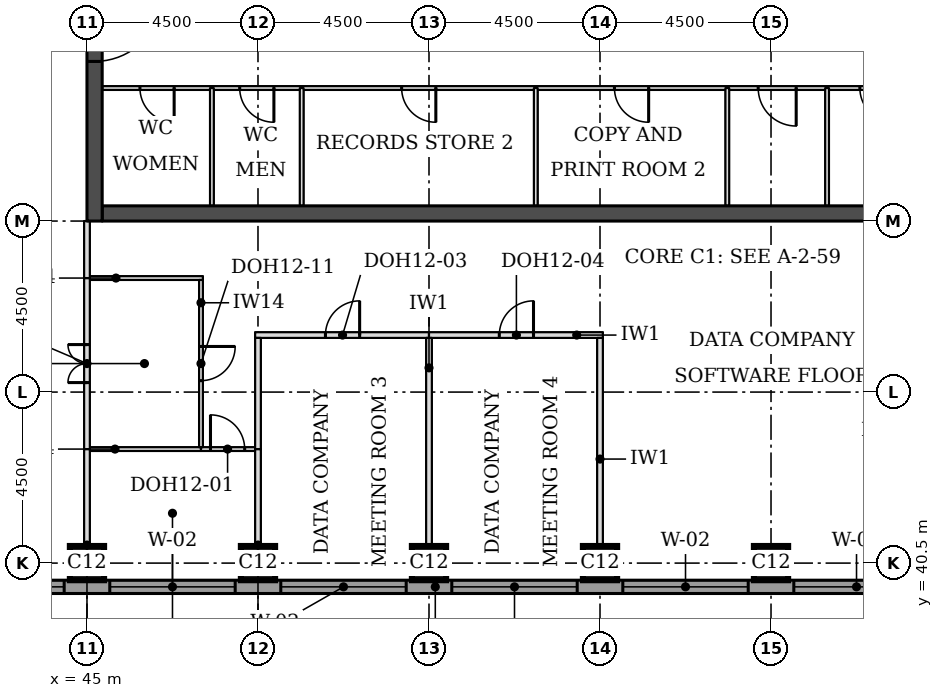
"""IFC4 building model, lengths in metres.
Left out: names, types, materials, properties, quantities, classifications, styles, units other than length and angle.
Written with IfcOpenShell. Run it as: python <this file> out.ifc"""

import sys

from ifc_helpers import new_model, si_unit, direction, frame, frame_2d, origin, origin_2d, place, context, subcontext, project, spatial, rectangle, extrude, element, fill, save


model = new_model("IFC4")
c1 = context("Model", 3, precision=1e-05, world=origin(), true_north=direction((0.0, 1.0)))
c2 = subcontext(c1, "Body", "Model", "MODEL_VIEW")
j1 = project(units=[si_unit("LENGTHUNIT", "METRE"), si_unit("PLANEANGLEUNIT", "RADIAN")], contexts=[c1])
p1 = place(None, origin())
s1 = spatial("IfcSite", under=j1, at=p1, CompositionType="ELEMENT")
p2 = place(p1, origin())
s2 = spatial("IfcBuilding", under=s1, at=p2, CompositionType="ELEMENT")
p3 = place(p2, frame((0.0, 0.0, 245.2)))
s3 = spatial("IfcBuildingStorey", under=s2, at=p3, CompositionType="ELEMENT", Elevation=245.2)
for number, where, z_axis, x_axis in (
    (1, (45.0, 40.5, 0.0), (0.0, 0.0, 1.0), (1.0, 0.0, 0.0)),
    (2, (49.5, 40.5, 0.0), (0.0, 0.0, 1.0), (1.0, 0.0, 0.0)),
    (3, (54.0, 40.5, 0.0), (0.0, 0.0, 1.0), (1.0, 0.0, 0.0)),
    (4, (58.5, 40.5, 0.0), (0.0, 0.0, 1.0), (1.0, 0.0, 0.0)),
    (5, (63.0, 40.5, 0.0), (0.0, 0.0, 1.0), (1.0, 0.0, 0.0)),
):
    element("IfcColumn", number, at=place(p3, frame(where, z_axis=z_axis, x_axis=x_axis)), inside=s3, PredefinedType="COLUMN", context=c2, shape_type="SweptSolid", body=[
        extrude(rectangle(XDim=0.9, YDim=0.9, at=origin_2d()), origin(), (0.0, 0.0, 1.0), 3.7),
    ])
p4 = place(p3, frame((45.4, 49.7, 0.0), z_axis=(0.0, 0.0, 1.0), x_axis=(1.0, 0.0, 0.0)))
e6 = element("IfcWall", 6, at=p4, inside=s3, PredefinedType="SHEAR", context=c2, shape_type="SweptSolid", body=[
    extrude(rectangle(XDim=21.7, YDim=0.4, at=frame_2d((10.85, 0.0))), origin(), (0.0, 0.0, 1.0), 3.7),
])
p5 = place(p3, frame((45.2, 49.5, 0.0), z_axis=(0.0, 0.0, 1.0), x_axis=(0.0, 1.0, 0.0)))
e7 = element("IfcWall", 7, at=p5, inside=s3, PredefinedType="SHEAR", context=c2, shape_type="SweptSolid", body=[
    extrude(rectangle(XDim=22.5, YDim=0.4, at=frame_2d((11.25, 0.0))), origin(), (0.0, 0.0, 1.0), 3.7),
])
p6 = place(p5, frame((4.2, 0.0, 0.0)))
e8 = element("IfcOpeningElement", 8, at=p6, cuts=e7, PredefinedType="OPENING", context=c2, shape_type="SweptSolid", body=[
    extrude(rectangle(XDim=1.8, YDim=2.1, at=frame_2d((0.9, 1.05))), frame((0.0, 0.21, 0.0), z_axis=(0.0, -1.0, 0.0), x_axis=(1.0, 0.0, 0.0)), (0.0, 0.0, 1.0), 0.42),
])
p7 = place(p5, frame((6.9, 0.0, 0.0)))
e9 = element("IfcOpeningElement", 9, at=p7, cuts=e7, PredefinedType="OPENING", context=c2, shape_type="SweptSolid", body=[
    extrude(rectangle(XDim=1.1, YDim=2.1, at=frame_2d((0.55, 1.05))), frame((0.0, 0.21, 0.0), z_axis=(0.0, -1.0, 0.0), x_axis=(1.0, 0.0, 0.0)), (0.0, 0.0, 1.0), 0.42),
])
p8 = place(p5, frame((13.6, 0.0, 0.0)))
e10 = element("IfcOpeningElement", 10, at=p8, cuts=e7, PredefinedType="OPENING", context=c2, shape_type="SweptSolid", body=[
    extrude(rectangle(XDim=1.1, YDim=2.1, at=frame_2d((0.55, 1.05))), frame((0.0, 0.21, 0.0), z_axis=(0.0, -1.0, 0.0), x_axis=(1.0, 0.0, 0.0)), (0.0, 0.0, 1.0), 0.42),
])
p9 = place(p5, frame((16.5, 0.0, 0.0)))
e11 = element("IfcOpeningElement", 11, at=p9, cuts=e7, PredefinedType="OPENING", context=c2, shape_type="SweptSolid", body=[
    extrude(rectangle(XDim=1.8, YDim=2.1, at=frame_2d((0.9, 1.05))), frame((0.0, 0.21, 0.0), z_axis=(0.0, -1.0, 0.0), x_axis=(1.0, 0.0, 0.0)), (0.0, 0.0, 1.0), 0.42),
])
p10 = place(p3, frame((36.0, 39.875, 0.0), z_axis=(0.0, 0.0, 1.0), x_axis=(1.0, 0.0, 0.0)))
e12 = element("IfcWall", 12, at=p10, inside=s3, PredefinedType="STANDARD", context=c2, shape_type="SweptSolid", body=[
    extrude(rectangle(XDim=36.331, YDim=0.35, at=frame_2d((18.166, 0.0))), origin(), (0.0, 0.0, 1.0), 3.525),
])
p11 = place(p10, frame((5.1, 0.0, 0.9)))
e13 = element("IfcOpeningElement", 13, at=p11, cuts=e12, PredefinedType="OPENING", context=c2, shape_type="SweptSolid", body=[
    extrude(rectangle(XDim=3.3, YDim=1.9, at=frame_2d((1.65, 0.95))), frame((0.0, 0.185, 0.0), z_axis=(0.0, -1.0, 0.0), x_axis=(1.0, 0.0, 0.0)), (0.0, 0.0, 1.0), 0.37),
])
p12 = place(p10, frame((9.6, 0.0, 0.9)))
e14 = element("IfcOpeningElement", 14, at=p12, cuts=e12, PredefinedType="OPENING", context=c2, shape_type="SweptSolid", body=[
    extrude(rectangle(XDim=3.3, YDim=1.9, at=frame_2d((1.65, 0.95))), frame((0.0, 0.185, 0.0), z_axis=(0.0, -1.0, 0.0), x_axis=(1.0, 0.0, 0.0)), (0.0, 0.0, 1.0), 0.37),
])
p13 = place(p10, frame((14.1, 0.0, 0.9)))
e15 = element("IfcOpeningElement", 15, at=p13, cuts=e12, PredefinedType="OPENING", context=c2, shape_type="SweptSolid", body=[
    extrude(rectangle(XDim=3.3, YDim=1.9, at=frame_2d((1.65, 0.95))), frame((0.0, 0.185, 0.0), z_axis=(0.0, -1.0, 0.0), x_axis=(1.0, 0.0, 0.0)), (0.0, 0.0, 1.0), 0.37),
])
p14 = place(p10, frame((18.6, 0.0, 0.9)))
e16 = element("IfcOpeningElement", 16, at=p14, cuts=e12, PredefinedType="OPENING", context=c2, shape_type="SweptSolid", body=[
    extrude(rectangle(XDim=3.3, YDim=1.9, at=frame_2d((1.65, 0.95))), frame((0.0, 0.185, 0.0), z_axis=(0.0, -1.0, 0.0), x_axis=(1.0, 0.0, 0.0)), (0.0, 0.0, 1.0), 0.37),
])
p15 = place(p10, frame((23.1, 0.0, 0.9)))
e17 = element("IfcOpeningElement", 17, at=p15, cuts=e12, PredefinedType="OPENING", context=c2, shape_type="SweptSolid", body=[
    extrude(rectangle(XDim=3.3, YDim=1.9, at=frame_2d((1.65, 0.95))), frame((0.0, 0.185, 0.0), z_axis=(0.0, -1.0, 0.0), x_axis=(1.0, 0.0, 0.0)), (0.0, 0.0, 1.0), 0.37),
])
p16 = place(p10, frame((27.6, 0.0, 0.9)))
e18 = element("IfcOpeningElement", 18, at=p16, cuts=e12, PredefinedType="OPENING", context=c2, shape_type="SweptSolid", body=[
    extrude(rectangle(XDim=3.3, YDim=1.9, at=frame_2d((1.65, 0.95))), frame((0.0, 0.185, 0.0), z_axis=(0.0, -1.0, 0.0), x_axis=(1.0, 0.0, 0.0)), (0.0, 0.0, 1.0), 0.37),
])
p17 = place(p3, frame((45.075, 43.5, 0.0), z_axis=(0.0, 0.0, 1.0), x_axis=(1.0, 0.0, 0.0)))
e19 = element("IfcWall", 19, at=p17, inside=s3, PredefinedType="PARTITIONING", context=c2, shape_type="SweptSolid", body=[
    extrude(rectangle(XDim=2.925, YDim=0.1, at=frame_2d((1.462, 0.0))), origin(), (0.0, 0.0, 1.0), 3.55),
])
p18 = place(p3, frame((48.0, 43.5, 0.0), z_axis=(0.0, 0.0, 1.0), x_axis=(1.0, 0.0, 0.0)))
e20 = element("IfcWall", 20, at=p18, inside=s3, PredefinedType="PARTITIONING", context=c2, shape_type="SweptSolid", body=[
    extrude(rectangle(XDim=1.425, YDim=0.1, at=frame_2d((0.712, 0.0))), origin(), (0.0, 0.0, 1.0), 3.55),
])
p19 = place(p18, frame((0.25, 0.0, 0.0)))
e21 = element("IfcOpeningElement", 21, at=p19, cuts=e20, PredefinedType="OPENING", context=c2, shape_type="SweptSolid", body=[
    extrude(rectangle(XDim=0.9, YDim=2.1, at=frame_2d((0.45, 1.05))), frame((0.0, 0.06, 0.0), z_axis=(0.0, -1.0, 0.0), x_axis=(1.0, 0.0, 0.0)), (0.0, 0.0, 1.0), 0.12),
])
p20 = place(p3, frame((49.425, 46.5, 0.0), z_axis=(0.0, 0.0, 1.0), x_axis=(1.0, 0.0, 0.0)))
e22 = element("IfcWall", 22, at=p20, inside=s3, PredefinedType="PARTITIONING", context=c2, shape_type="SweptSolid", body=[
    extrude(rectangle(XDim=4.575, YDim=0.15, at=frame_2d((2.288, 0.0))), origin(), (0.0, 0.0, 1.0), 3.55),
])
p21 = place(p20, frame((1.85, 0.0, 0.0)))
e23 = element("IfcOpeningElement", 23, at=p21, cuts=e22, PredefinedType="OPENING", context=c2, shape_type="SweptSolid", body=[
    extrude(rectangle(XDim=0.9, YDim=2.1, at=frame_2d((0.45, 1.05))), frame((0.0, 0.085, 0.0), z_axis=(0.0, -1.0, 0.0), x_axis=(1.0, 0.0, 0.0)), (0.0, 0.0, 1.0), 0.17),
])
p22 = place(p3, frame((54.0, 46.5, 0.0), z_axis=(0.0, 0.0, 1.0), x_axis=(1.0, 0.0, 0.0)))
e24 = element("IfcWall", 24, at=p22, inside=s3, PredefinedType="PARTITIONING", context=c2, shape_type="SweptSolid", body=[
    extrude(rectangle(XDim=4.575, YDim=0.15, at=frame_2d((2.288, 0.0))), origin(), (0.0, 0.0, 1.0), 3.55),
])
p23 = place(p22, frame((1.85, 0.0, 0.0)))
e25 = element("IfcOpeningElement", 25, at=p23, cuts=e24, PredefinedType="OPENING", context=c2, shape_type="SweptSolid", body=[
    extrude(rectangle(XDim=0.9, YDim=2.1, at=frame_2d((0.45, 1.05))), frame((0.0, 0.085, 0.0), z_axis=(0.0, -1.0, 0.0), x_axis=(1.0, 0.0, 0.0)), (0.0, 0.0, 1.0), 0.17),
])
p24 = place(p3, frame((45.075, 48.0, 0.0), z_axis=(0.0, 0.0, 1.0), x_axis=(1.0, 0.0, 0.0)))
e26 = element("IfcWall", 26, at=p24, inside=s3, PredefinedType="PARTITIONING", context=c2, shape_type="SweptSolid", body=[
    extrude(rectangle(XDim=2.975, YDim=0.1, at=frame_2d((1.488, 0.0))), origin(), (0.0, 0.0, 1.0), 3.55),
])
p25 = place(p3, frame((45.0, 40.05, 0.0), z_axis=(0.0, 0.0, 1.0), x_axis=(0.0, 1.0, 0.0)))
e27 = element("IfcWall", 27, at=p25, inside=s3, PredefinedType="PARTITIONING", context=c2, shape_type="SweptSolid", body=[
    extrude(rectangle(XDim=3.45, YDim=0.15, at=frame_2d((1.725, 0.0))), origin(), (0.0, 0.0, 1.0), 3.022),
])
p26 = place(p3, frame((49.5, 40.05, 0.0), z_axis=(0.0, 0.0, 1.0), x_axis=(0.0, 1.0, 0.0)))
e28 = element("IfcWall", 28, at=p26, inside=s3, PredefinedType="PARTITIONING", context=c2, shape_type="SweptSolid", body=[
    extrude(rectangle(XDim=3.45, YDim=0.15, at=frame_2d((1.725, 0.0))), origin(), (0.0, 0.0, 1.0), 3.55),
])
for number, where, z_axis, x_axis in (
    (29, (54.0, 40.05, 0.0), (0.0, 0.0, 1.0), (0.0, 1.0, 0.0)),
    (30, (58.5, 40.05, 0.0), (0.0, 0.0, 1.0), (0.0, 1.0, 0.0)),
):
    element("IfcWall", number, at=place(p3, frame(where, z_axis=z_axis, x_axis=x_axis)), inside=s3, PredefinedType="PARTITIONING", context=c2, shape_type="SweptSolid", body=[
        extrude(rectangle(XDim=6.375, YDim=0.15, at=frame_2d((3.188, 0.0))), origin(), (0.0, 0.0, 1.0), 3.55),
    ])
p27 = place(p3, frame((45.0, 43.5, 0.0), z_axis=(0.0, 0.0, 1.0), x_axis=(0.0, 1.0, 0.0)))
e31 = element("IfcWall", 31, at=p27, inside=s3, PredefinedType="PARTITIONING", context=c2, shape_type="SweptSolid", body=[
    extrude(rectangle(XDim=4.5, YDim=0.15, at=frame_2d((2.25, 0.0))), origin(), (0.0, 0.0, 1.0), 3.022),
])
p28 = place(p27, frame((1.75, 0.0, 0.0)))
e32 = element("IfcOpeningElement", 32, at=p28, cuts=e31, PredefinedType="OPENING", context=c2, shape_type="SweptSolid", body=[
    extrude(rectangle(XDim=1.0, YDim=2.1, at=frame_2d((0.5, 1.05))), frame((0.0, 0.085, 0.0), z_axis=(0.0, -1.0, 0.0), x_axis=(1.0, 0.0, 0.0)), (0.0, 0.0, 1.0), 0.17),
])
p29 = place(p3, frame((49.5, 43.5, 0.0), z_axis=(0.0, 0.0, 1.0), x_axis=(0.0, 1.0, 0.0)))
e33 = element("IfcWall", 33, at=p29, inside=s3, PredefinedType="PARTITIONING", context=c2, shape_type="SweptSolid", body=[
    extrude(rectangle(XDim=2.925, YDim=0.15, at=frame_2d((1.462, 0.0))), origin(), (0.0, 0.0, 1.0), 3.55),
])
p30 = place(p3, frame((48.0, 43.55, 0.0), z_axis=(0.0, 0.0, 1.0), x_axis=(0.0, 1.0, 0.0)))
e34 = element("IfcWall", 34, at=p30, inside=s3, PredefinedType="PARTITIONING", context=c2, shape_type="SweptSolid", body=[
    extrude(rectangle(XDim=4.4, YDim=0.1, at=frame_2d((2.2, 0.0))), origin(), (0.0, 0.0, 1.0), 3.55),
])
p31 = place(p30, frame((1.75, 0.0, 0.0)))
e35 = element("IfcOpeningElement", 35, at=p31, cuts=e34, PredefinedType="OPENING", context=c2, shape_type="SweptSolid", body=[
    extrude(rectangle(XDim=0.9, YDim=2.1, at=frame_2d((0.45, 1.05))), frame((0.0, 0.06, 0.0), z_axis=(0.0, -1.0, 0.0), x_axis=(1.0, 0.0, 0.0)), (0.0, 0.0, 1.0), 0.12),
])
p32 = place(p3, frame((45.0, 48.0, 0.0), z_axis=(0.0, 0.0, 1.0), x_axis=(0.0, 1.0, 0.0)))
e36 = element("IfcWall", 36, at=p32, inside=s3, PredefinedType="PARTITIONING", context=c2, shape_type="SweptSolid", body=[
    extrude(rectangle(XDim=1.5, YDim=0.15, at=frame_2d((0.75, 0.0))), origin(), (0.0, 0.0, 1.0), 3.022),
])
p33 = place(p3, frame((45.4, 53.0, 0.0), z_axis=(0.0, 0.0, 1.0), x_axis=(1.0, 0.0, 0.0)))
e37 = element("IfcWall", 37, at=p33, inside=s3, PredefinedType="PARTITIONING", context=c2, shape_type="SweptSolid", body=[
    extrude(rectangle(XDim=21.7, YDim=0.1, at=frame_2d((10.85, 0.0))), origin(), (0.0, 0.0, 1.0), 3.55),
])
p34 = place(p33, frame((19.938, 0.0, 0.0)))
e38 = element("IfcOpeningElement", 38, at=p34, cuts=e37, PredefinedType="OPENING", context=c2, shape_type="SweptSolid", body=[
    extrude(rectangle(XDim=0.9, YDim=2.1, at=frame_2d((0.45, 1.05))), frame((0.0, 0.06, 0.0), z_axis=(0.0, -1.0, 0.0), x_axis=(1.0, 0.0, 0.0)), (0.0, 0.0, 1.0), 0.12),
])
p35 = place(p33, frame((17.262, 0.0, 0.0)))
e39 = element("IfcOpeningElement", 39, at=p35, cuts=e37, PredefinedType="OPENING", context=c2, shape_type="SweptSolid", body=[
    extrude(rectangle(XDim=1.0, YDim=2.1, at=frame_2d((0.5, 1.05))), frame((0.0, 0.06, 0.0), z_axis=(0.0, -1.0, 0.0), x_axis=(1.0, 0.0, 0.0)), (0.0, 0.0, 1.0), 0.12),
])
p36 = place(p33, frame((0.994, 0.0, 0.0)))
e40 = element("IfcOpeningElement", 40, at=p36, cuts=e37, PredefinedType="OPENING", context=c2, shape_type="SweptSolid", body=[
    extrude(rectangle(XDim=0.9, YDim=2.1, at=frame_2d((0.45, 1.05))), frame((0.0, 0.06, 0.0), z_axis=(0.0, -1.0, 0.0), x_axis=(1.0, 0.0, 0.0)), (0.0, 0.0, 1.0), 0.12),
])
p37 = place(p33, frame((3.619, 0.0, 0.0)))
e41 = element("IfcOpeningElement", 41, at=p37, cuts=e37, PredefinedType="OPENING", context=c2, shape_type="SweptSolid", body=[
    extrude(rectangle(XDim=0.9, YDim=2.1, at=frame_2d((0.45, 1.05))), frame((0.0, 0.06, 0.0), z_axis=(0.0, -1.0, 0.0), x_axis=(1.0, 0.0, 0.0)), (0.0, 0.0, 1.0), 0.12),
])
p38 = place(p33, frame((7.88, 0.0, 0.0)))
e42 = element("IfcOpeningElement", 42, at=p38, cuts=e37, PredefinedType="OPENING", context=c2, shape_type="SweptSolid", body=[
    extrude(rectangle(XDim=0.9, YDim=2.1, at=frame_2d((0.45, 1.05))), frame((0.0, 0.06, 0.0), z_axis=(0.0, -1.0, 0.0), x_axis=(1.0, 0.0, 0.0)), (0.0, 0.0, 1.0), 0.12),
])
p39 = place(p33, frame((13.48, 0.0, 0.0)))
e43 = element("IfcOpeningElement", 43, at=p39, cuts=e37, PredefinedType="OPENING", context=c2, shape_type="SweptSolid", body=[
    extrude(rectangle(XDim=0.9, YDim=2.1, at=frame_2d((0.45, 1.05))), frame((0.0, 0.06, 0.0), z_axis=(0.0, -1.0, 0.0), x_axis=(1.0, 0.0, 0.0)), (0.0, 0.0, 1.0), 0.12),
])
for number, where, z_axis, x_axis in (
    (44, (48.288, 49.9, 0.0), (0.0, 0.0, 1.0), (0.0, 1.0, 0.0)),
    (45, (50.65, 49.9, 0.0), (0.0, 0.0, 1.0), (0.0, 1.0, 0.0)),
    (46, (56.81, 49.9, 0.0), (0.0, 0.0, 1.0), (0.0, 1.0, 0.0)),
    (47, (61.85, 49.9, 0.0), (0.0, 0.0, 1.0), (0.0, 1.0, 0.0)),
    (48, (64.475, 49.9, 0.0), (0.0, 0.0, 1.0), (0.0, 1.0, 0.0)),
):
    element("IfcWall", number, at=place(p3, frame(where, z_axis=z_axis, x_axis=x_axis)), inside=s3, PredefinedType="PARTITIONING", context=c2, shape_type="SweptSolid", body=[
        extrude(rectangle(XDim=3.1, YDim=0.1, at=frame_2d((1.55, 0.0))), origin(), (0.0, 0.0, 1.0), 3.55),
    ])
p40 = place(p11, origin())
e49 = element("IfcWindow", 49, at=p40, inside=s3, PartitioningType="SINGLE_PANEL", PredefinedType="WINDOW", context=c2, shape_type="SweptSolid", body=[
    extrude(rectangle(XDim=3.3, YDim=1.9, at=frame_2d((1.65, 0.95))), frame((0.0, 0.085, 0.0), z_axis=(0.0, -1.0, 0.0), x_axis=(1.0, 0.0, 0.0)), (0.0, 0.0, 1.0), 0.06),
])
fill(e13, e49)
p41 = place(p12, origin())
e50 = element("IfcWindow", 50, at=p41, inside=s3, PartitioningType="SINGLE_PANEL", PredefinedType="WINDOW", context=c2, shape_type="SweptSolid", body=[
    extrude(rectangle(XDim=3.3, YDim=1.9, at=frame_2d((1.65, 0.95))), frame((0.0, 0.085, 0.0), z_axis=(0.0, -1.0, 0.0), x_axis=(1.0, 0.0, 0.0)), (0.0, 0.0, 1.0), 0.06),
])
fill(e14, e50)
p42 = place(p13, origin())
e51 = element("IfcWindow", 51, at=p42, inside=s3, PartitioningType="SINGLE_PANEL", PredefinedType="WINDOW", context=c2, shape_type="SweptSolid", body=[
    extrude(rectangle(XDim=3.3, YDim=1.9, at=frame_2d((1.65, 0.95))), frame((0.0, 0.085, 0.0), z_axis=(0.0, -1.0, 0.0), x_axis=(1.0, 0.0, 0.0)), (0.0, 0.0, 1.0), 0.06),
])
fill(e15, e51)
p43 = place(p14, origin())
e52 = element("IfcWindow", 52, at=p43, inside=s3, PartitioningType="SINGLE_PANEL", PredefinedType="WINDOW", context=c2, shape_type="SweptSolid", body=[
    extrude(rectangle(XDim=3.3, YDim=1.9, at=frame_2d((1.65, 0.95))), frame((0.0, 0.085, 0.0), z_axis=(0.0, -1.0, 0.0), x_axis=(1.0, 0.0, 0.0)), (0.0, 0.0, 1.0), 0.06),
])
fill(e16, e52)
p44 = place(p15, origin())
e53 = element("IfcWindow", 53, at=p44, inside=s3, PartitioningType="SINGLE_PANEL", PredefinedType="WINDOW", context=c2, shape_type="SweptSolid", body=[
    extrude(rectangle(XDim=3.3, YDim=1.9, at=frame_2d((1.65, 0.95))), frame((0.0, 0.085, 0.0), z_axis=(0.0, -1.0, 0.0), x_axis=(1.0, 0.0, 0.0)), (0.0, 0.0, 1.0), 0.06),
])
fill(e17, e53)
p45 = place(p16, origin())
e54 = element("IfcWindow", 54, at=p45, inside=s3, PartitioningType="SINGLE_PANEL", PredefinedType="WINDOW", context=c2, shape_type="SweptSolid", body=[
    extrude(rectangle(XDim=3.3, YDim=1.9, at=frame_2d((1.65, 0.95))), frame((0.0, 0.085, 0.0), z_axis=(0.0, -1.0, 0.0), x_axis=(1.0, 0.0, 0.0)), (0.0, 0.0, 1.0), 0.06),
])
fill(e18, e54)
p46 = place(p28, origin())
e55 = element("IfcDoor", 55, at=p46, inside=s3, OperationType="DOUBLE_DOOR_SINGLE_SWING", PredefinedType="DOOR", context=c2, shape_type="SweptSolid", body=[
    extrude(rectangle(XDim=1.0, YDim=2.1, at=frame_2d((0.5, 1.05))), frame((0.0, 0.025, 0.0), z_axis=(0.0, -1.0, 0.0), x_axis=(1.0, 0.0, 0.0)), (0.0, 0.0, 1.0), 0.05),
])
fill(e32, e55)
p47 = place(p31, frame((0.9, 0.0, 0.0), z_axis=(0.0, 0.0, 1.0), x_axis=(-1.0, 0.0, 0.0)))
e56 = element("IfcDoor", 56, at=p47, inside=s3, OperationType="SINGLE_SWING_LEFT", PredefinedType="DOOR", context=c2, shape_type="SweptSolid", body=[
    extrude(rectangle(XDim=0.9, YDim=2.1, at=frame_2d((0.45, 1.05))), frame((0.0, 0.025, 0.0), z_axis=(0.0, -1.0, 0.0), x_axis=(1.0, 0.0, 0.0)), (0.0, 0.0, 1.0), 0.05),
])
fill(e35, e56)
p48 = place(p21, origin())
e57 = element("IfcDoor", 57, at=p48, inside=s3, OperationType="SINGLE_SWING_RIGHT", PredefinedType="DOOR", context=c2, shape_type="SweptSolid", body=[
    extrude(rectangle(XDim=0.9, YDim=2.1, at=frame_2d((0.45, 1.05))), frame((0.0, 0.025, 0.0), z_axis=(0.0, -1.0, 0.0), x_axis=(1.0, 0.0, 0.0)), (0.0, 0.0, 1.0), 0.05),
])
fill(e23, e57)
p49 = place(p23, origin())
e58 = element("IfcDoor", 58, at=p49, inside=s3, OperationType="SINGLE_SWING_RIGHT", PredefinedType="DOOR", context=c2, shape_type="SweptSolid", body=[
    extrude(rectangle(XDim=0.9, YDim=2.1, at=frame_2d((0.45, 1.05))), frame((0.0, 0.025, 0.0), z_axis=(0.0, -1.0, 0.0), x_axis=(1.0, 0.0, 0.0)), (0.0, 0.0, 1.0), 0.05),
])
fill(e25, e58)
p50 = place(p19, origin())
e59 = element("IfcDoor", 59, at=p50, inside=s3, OperationType="SINGLE_SWING_LEFT", PredefinedType="DOOR", context=c2, shape_type="SweptSolid", body=[
    extrude(rectangle(XDim=0.9, YDim=2.1, at=frame_2d((0.45, 1.05))), frame((0.0, 0.025, 0.0), z_axis=(0.0, -1.0, 0.0), x_axis=(1.0, 0.0, 0.0)), (0.0, 0.0, 1.0), 0.05),
])
fill(e21, e59)
p51 = place(p6, frame((1.8, 0.0, 0.0), z_axis=(0.0, 0.0, 1.0), x_axis=(-1.0, 0.0, 0.0)))
e60 = element("IfcDoor", 60, at=p51, inside=s3, OperationType="SINGLE_SWING_LEFT", PredefinedType="DOOR", context=c2, shape_type="SweptSolid", body=[
    extrude(rectangle(XDim=1.8, YDim=2.1, at=frame_2d((0.9, 1.05))), frame((0.0, 0.025, 0.0), z_axis=(0.0, -1.0, 0.0), x_axis=(1.0, 0.0, 0.0)), (0.0, 0.0, 1.0), 0.05),
])
fill(e8, e60)
p52 = place(p34, frame((0.9, 0.0, 0.0), z_axis=(0.0, 0.0, 1.0), x_axis=(-1.0, 0.0, 0.0)))
e61 = element("IfcDoor", 61, at=p52, inside=s3, OperationType="SINGLE_SWING_LEFT", PredefinedType="DOOR", context=c2, shape_type="SweptSolid", body=[
    extrude(rectangle(XDim=0.9, YDim=2.1, at=frame_2d((0.45, 1.05))), frame((0.0, 0.025, 0.0), z_axis=(0.0, -1.0, 0.0), x_axis=(1.0, 0.0, 0.0)), (0.0, 0.0, 1.0), 0.05),
])
fill(e38, e61)
p53 = place(p35, frame((1.0, 0.0, 0.0), z_axis=(0.0, 0.0, 1.0), x_axis=(-1.0, 0.0, 0.0)))
e62 = element("IfcDoor", 62, at=p53, inside=s3, OperationType="SINGLE_SWING_LEFT", PredefinedType="DOOR", context=c2, shape_type="SweptSolid", body=[
    extrude(rectangle(XDim=1.0, YDim=2.1, at=frame_2d((0.5, 1.05))), frame((0.0, 0.025, 0.0), z_axis=(0.0, -1.0, 0.0), x_axis=(1.0, 0.0, 0.0)), (0.0, 0.0, 1.0), 0.05),
])
fill(e39, e62)
p54 = place(p36, frame((0.9, 0.0, 0.0), z_axis=(0.0, 0.0, 1.0), x_axis=(-1.0, 0.0, 0.0)))
e63 = element("IfcDoor", 63, at=p54, inside=s3, OperationType="SINGLE_SWING_LEFT", PredefinedType="DOOR", context=c2, shape_type="SweptSolid", body=[
    extrude(rectangle(XDim=0.9, YDim=2.1, at=frame_2d((0.45, 1.05))), frame((0.0, 0.025, 0.0), z_axis=(0.0, -1.0, 0.0), x_axis=(1.0, 0.0, 0.0)), (0.0, 0.0, 1.0), 0.05),
])
fill(e40, e63)
p55 = place(p37, frame((0.9, 0.0, 0.0), z_axis=(0.0, 0.0, 1.0), x_axis=(-1.0, 0.0, 0.0)))
e64 = element("IfcDoor", 64, at=p55, inside=s3, OperationType="SINGLE_SWING_LEFT", PredefinedType="DOOR", context=c2, shape_type="SweptSolid", body=[
    extrude(rectangle(XDim=0.9, YDim=2.1, at=frame_2d((0.45, 1.05))), frame((0.0, 0.025, 0.0), z_axis=(0.0, -1.0, 0.0), x_axis=(1.0, 0.0, 0.0)), (0.0, 0.0, 1.0), 0.05),
])
fill(e41, e64)
p56 = place(p38, frame((0.9, 0.0, 0.0), z_axis=(0.0, 0.0, 1.0), x_axis=(-1.0, 0.0, 0.0)))
e65 = element("IfcDoor", 65, at=p56, inside=s3, OperationType="SINGLE_SWING_LEFT", PredefinedType="DOOR", context=c2, shape_type="SweptSolid", body=[
    extrude(rectangle(XDim=0.9, YDim=2.1, at=frame_2d((0.45, 1.05))), frame((0.0, 0.025, 0.0), z_axis=(0.0, -1.0, 0.0), x_axis=(1.0, 0.0, 0.0)), (0.0, 0.0, 1.0), 0.05),
])
fill(e42, e65)
p57 = place(p39, frame((0.9, 0.0, 0.0), z_axis=(0.0, 0.0, 1.0), x_axis=(-1.0, 0.0, 0.0)))
e66 = element("IfcDoor", 66, at=p57, inside=s3, OperationType="SINGLE_SWING_LEFT", PredefinedType="DOOR", context=c2, shape_type="SweptSolid", body=[
    extrude(rectangle(XDim=0.9, YDim=2.1, at=frame_2d((0.45, 1.05))), frame((0.0, 0.025, 0.0), z_axis=(0.0, -1.0, 0.0), x_axis=(1.0, 0.0, 0.0)), (0.0, 0.0, 1.0), 0.05),
])
fill(e43, e66)
save(model, sys.argv[1])
